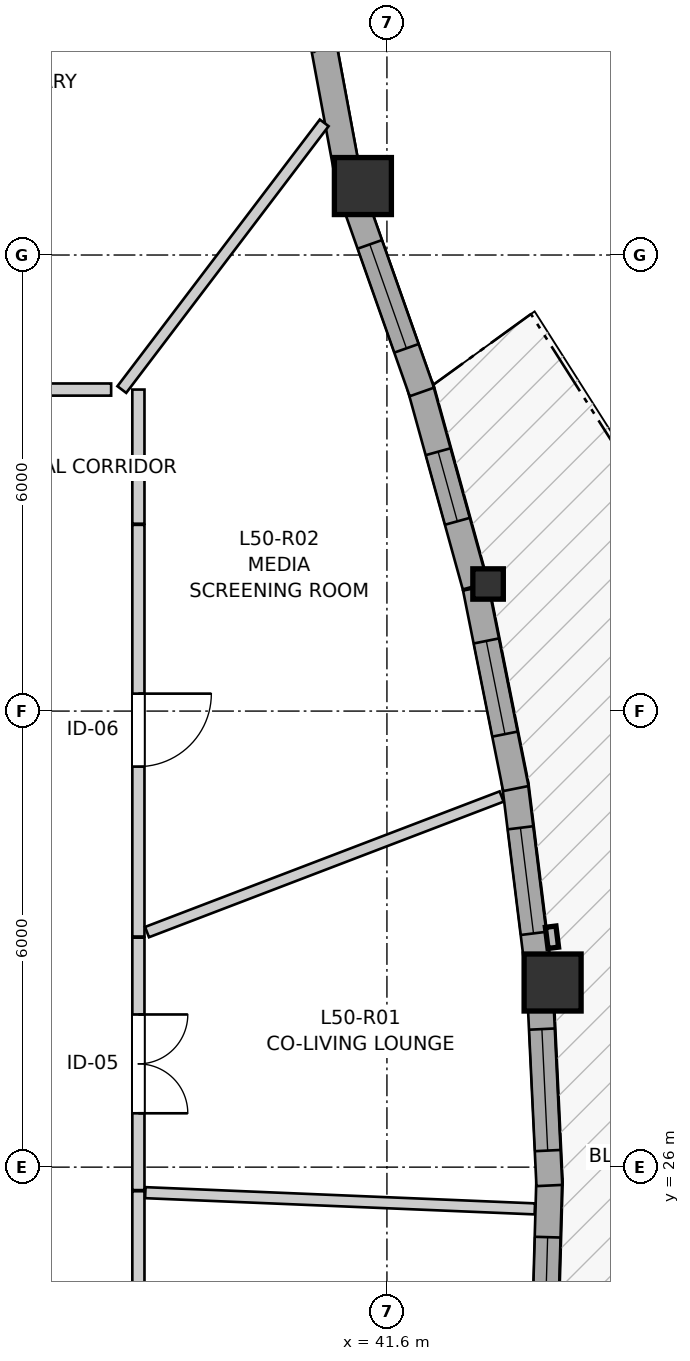
"""IFC4 building model, lengths in metres.
Left out: names, types, materials, properties, quantities, classifications, styles, units other than length and angle.
Written with IfcOpenShell. Run it as: python <this file> out.ifc"""

import sys

from ifc_helpers import new_model, si_unit, direction, frame, frame_2d, origin, origin_2d, place, context, subcontext, project, spatial, rectangle, i_section, extrude, source, transform, mapped, element, fill, save


model = new_model("IFC4")
c1 = context("Model", 3, precision=1e-05, world=origin(), true_north=direction((0.0, 1.0)))
c2 = subcontext(c1, "Body", "Model", "MODEL_VIEW")
j1 = project(units=[si_unit("LENGTHUNIT", "METRE"), si_unit("PLANEANGLEUNIT", "RADIAN")], contexts=[c1])
p1 = place(None, origin())
s1 = spatial("IfcSite", under=j1, at=p1, CompositionType="ELEMENT")
p2 = place(p1, origin())
s2 = spatial("IfcBuilding", under=s1, at=p2, CompositionType="ELEMENT")
p3 = place(p2, frame((0.0, 0.0, 168.2)))
s3 = spatial("IfcBuildingStorey", under=s2, at=p3, CompositionType="ELEMENT", Elevation=168.2)
m1 = source(origin(), c2, "Body", "SweptSolid", [
    extrude(rectangle(XDim=0.75, YDim=0.75, at=origin_2d()), origin(), (0.0, 0.0, 1.0), 2.95),
])
p4 = place(p3, frame((43.78, 28.429, 0.0), z_axis=(0.0, 0.0, 1.0), x_axis=(1.0, 0.0, 0.0)))
e1 = element("IfcColumn", 1, at=p4, inside=s3, PredefinedType="COLUMN", context=c2, shape_type="MappedRepresentation", body=[
    mapped(m1, transform((0.0, 0.0, 0.0), x_axis=(1.0, 0.0, 0.0), y_axis=(0.0, 1.0, 0.0), z_axis=(0.0, 0.0, 1.0), scale=1.0)),
])
m2 = source(origin(), c2, "Body", "SweptSolid", [
    extrude(i_section(OverallWidth=0.401, OverallDepth=0.399, WebThickness=0.023, FlangeThickness=0.036, FilletRadius=0.015, at=origin_2d()), origin(), (0.0, 0.0, 1.0), 2.95),
])
p5 = place(p3, frame((42.931, 33.672, 0.0), z_axis=(0.0, 0.0, 1.0), x_axis=(1.0, 0.0, 0.0)))
e2 = element("IfcColumn", 2, at=p5, inside=s3, PredefinedType="PILASTER", context=c2, shape_type="MappedRepresentation", body=[
    mapped(m2, transform((0.0, 0.0, 0.0), x_axis=(1.0, 0.0, 0.0), y_axis=(0.0, 1.0, 0.0), z_axis=(0.0, 0.0, 1.0), scale=1.0)),
])
p6 = place(p3, frame((41.284, 38.907, 0.0), z_axis=(0.0, 0.0, 1.0), x_axis=(1.0, 0.0, 0.0)))
e3 = element("IfcColumn", 3, at=p6, inside=s3, PredefinedType="COLUMN", context=c2, shape_type="MappedRepresentation", body=[
    mapped(m1, transform((0.0, 0.0, 0.0), x_axis=(1.0, 0.0, 0.0), y_axis=(0.0, 1.0, 0.0), z_axis=(0.0, 0.0, 1.0), scale=1.0)),
])
p7 = place(p3, frame((43.661, 23.203, 0.0), z_axis=(0.0, 0.0, 1.0), x_axis=(0.028240970376, 0.999601144253, 0.0)))
e4 = element("IfcWall", 4, at=p7, inside=s3, PredefinedType="SOLIDWALL", context=c2, shape_type="SweptSolid", body=[
    extrude(rectangle(XDim=2.645, YDim=0.34, at=frame_2d((1.323, 0.0))), origin(), (0.0, 0.0, 1.0), 2.53),
])
p8 = place(p7, frame((0.427, 0.0, 0.82)))
e5 = element("IfcOpeningElement", 5, at=p8, cuts=e4, PredefinedType="OPENING", context=c2, shape_type="SweptSolid", body=[
    extrude(rectangle(XDim=1.45, YDim=1.25, at=frame_2d((0.725, 0.625))), frame((0.0, 0.18, 0.0), z_axis=(0.0, -1.0, 0.0), x_axis=(1.0, 0.0, 0.0)), (0.0, 0.0, 1.0), 0.36),
])
p9 = place(p3, frame((43.737, 25.758, 0.0), z_axis=(0.0, 0.0, 1.0), x_axis=(-0.047648310491, 0.998864174204, 0.0)))
e6 = element("IfcWall", 6, at=p9, inside=s3, PredefinedType="SOLIDWALL", context=c2, shape_type="SweptSolid", body=[
    extrude(rectangle(XDim=2.511, YDim=0.34, at=frame_2d((1.255, 0.0))), origin(), (0.0, 0.0, 1.0), 2.53),
])
p10 = place(p9, frame((0.46, 0.0, 0.82)))
e7 = element("IfcOpeningElement", 7, at=p10, cuts=e6, PredefinedType="OPENING", context=c2, shape_type="SweptSolid", body=[
    extrude(rectangle(XDim=1.6, YDim=1.35, at=frame_2d((0.8, 0.675))), frame((0.0, 0.18, 0.0), z_axis=(0.0, -1.0, 0.0), x_axis=(1.0, 0.0, 0.0)), (0.0, 0.0, 1.0), 0.36),
])
p11 = place(p3, frame((43.592, 28.562, 0.0), z_axis=(0.0, 0.0, 1.0), x_axis=(-0.122868649786, 0.992422941542, 0.0)))
e8 = element("IfcWall", 8, at=p11, inside=s3, PredefinedType="SOLIDWALL", context=c2, shape_type="SweptSolid", body=[
    extrude(rectangle(XDim=2.525, YDim=0.34, at=frame_2d((1.263, 0.0))), origin(), (0.0, 0.0, 1.0), 2.53),
])
p12 = place(p11, frame((0.517, 0.0, 0.82)))
e9 = element("IfcOpeningElement", 9, at=p12, cuts=e8, PredefinedType="OPENING", context=c2, shape_type="SweptSolid", body=[
    extrude(rectangle(XDim=1.4, YDim=1.35, at=frame_2d((0.7, 0.675))), frame((0.0, 0.18, 0.0), z_axis=(0.0, -1.0, 0.0), x_axis=(1.0, 0.0, 0.0)), (0.0, 0.0, 1.0), 0.36),
])
p13 = place(p3, frame((43.296, 30.981, 0.0), z_axis=(0.0, 0.0, 1.0), x_axis=(-0.196185936796, 0.980566712776, 0.0)))
e10 = element("IfcWall", 10, at=p13, inside=s3, PredefinedType="SOLIDWALL", context=c2, shape_type="SweptSolid", body=[
    extrude(rectangle(XDim=2.69, YDim=0.34, at=frame_2d((1.345, 0.0))), origin(), (0.0, 0.0, 1.0), 2.53),
])
p14 = place(p13, frame((0.73, 0.0, 0.82)))
e11 = element("IfcOpeningElement", 11, at=p14, cuts=e10, PredefinedType="OPENING", context=c2, shape_type="SweptSolid", body=[
    extrude(rectangle(XDim=1.25, YDim=1.35, at=frame_2d((0.625, 0.675))), frame((0.0, 0.18, 0.0), z_axis=(0.0, -1.0, 0.0), x_axis=(1.0, 0.0, 0.0)), (0.0, 0.0, 1.0), 0.36),
])
p15 = place(p3, frame((42.762, 33.646, 0.0), z_axis=(0.0, 0.0, 1.0), x_axis=(-0.266469604257, 0.963843322334, 0.0)))
e12 = element("IfcWall", 12, at=p15, inside=s3, PredefinedType="SOLIDWALL", context=c2, shape_type="SweptSolid", body=[
    extrude(rectangle(XDim=2.735, YDim=0.34, at=frame_2d((1.367, 0.0))), origin(), (0.0, 0.0, 1.0), 2.53),
])
p16 = place(p15, frame((0.882, 0.0, 0.82)))
e13 = element("IfcOpeningElement", 13, at=p16, cuts=e12, PredefinedType="OPENING", context=c2, shape_type="SweptSolid", body=[
    extrude(rectangle(XDim=0.95, YDim=1.35, at=frame_2d((0.475, 0.675))), frame((0.0, 0.18, 0.0), z_axis=(0.0, -1.0, 0.0), x_axis=(1.0, 0.0, 0.0)), (0.0, 0.0, 1.0), 0.36),
])
p17 = place(p3, frame((42.059, 36.198, 0.0), z_axis=(0.0, 0.0, 1.0), x_axis=(-0.332714406781, 0.943027636668, 0.0)))
e14 = element("IfcWall", 14, at=p17, inside=s3, PredefinedType="SOLIDWALL", context=c2, shape_type="SweptSolid", body=[
    extrude(rectangle(XDim=2.658, YDim=0.34, at=frame_2d((1.329, 0.0))), origin(), (0.0, 0.0, 1.0), 2.53),
])
p18 = place(p17, frame((0.609, 0.0, 0.82)))
e15 = element("IfcOpeningElement", 15, at=p18, cuts=e14, PredefinedType="OPENING", context=c2, shape_type="SweptSolid", body=[
    extrude(rectangle(XDim=1.45, YDim=1.25, at=frame_2d((0.725, 0.625))), frame((0.0, 0.18, 0.0), z_axis=(0.0, -1.0, 0.0), x_axis=(1.0, 0.0, 0.0)), (0.0, 0.0, 1.0), 0.36),
])
p19 = place(p3, frame((41.088, 39.029, 0.0), z_axis=(0.0, 0.0, 1.0), x_axis=(-0.18244577317, 0.983215917209, 0.0)))
e16 = element("IfcWall", 16, at=p19, inside=s3, PredefinedType="SOLIDWALL", context=c2, shape_type="SweptSolid", body=[
    extrude(rectangle(XDim=1.888, YDim=0.34, at=frame_2d((0.944, 0.0))), origin(), (0.0, 0.0, 1.0), 2.53),
])
p20 = place(p3, frame((38.33, 34.45, 0.0), z_axis=(0.0, 0.0, 1.0), x_axis=(0.0, -1.0, 0.0)))
e17 = element("IfcWall", 17, at=p20, inside=s3, PredefinedType="PARTITIONING", context=c2, shape_type="SweptSolid", body=[
    extrude(rectangle(XDim=5.416, YDim=0.16, at=frame_2d((2.708, 0.0))), origin(), (0.0, 0.0, 1.0), 2.588),
])
p21 = place(p20, frame((2.22, 0.0, 0.0)))
e18 = element("IfcOpeningElement", 18, at=p21, cuts=e17, PredefinedType="OPENING", context=c2, shape_type="SweptSolid", body=[
    extrude(rectangle(XDim=0.96, YDim=2.1, at=frame_2d((0.48, 1.05))), frame((0.0, 0.09, 0.0), z_axis=(0.0, -1.0, 0.0), x_axis=(1.0, 0.0, 0.0)), (0.0, 0.0, 1.0), 0.18),
])
p22 = place(p3, frame((38.33, 25.683, 0.0), z_axis=(0.0, 0.0, 1.0), x_axis=(0.0, -1.0, 0.0)))
e19 = element("IfcWall", 19, at=p22, inside=s3, PredefinedType="PARTITIONING", context=c2, shape_type="SweptSolid", body=[
    extrude(rectangle(XDim=4.483, YDim=0.16, at=frame_2d((2.242, 0.0))), origin(), (0.0, 0.0, 1.0), 2.95),
])
p23 = place(p22, frame((1.769, 0.0, 0.0)))
e20 = element("IfcOpeningElement", 20, at=p23, cuts=e19, PredefinedType="OPENING", context=c2, shape_type="SweptSolid", body=[
    extrude(rectangle(XDim=0.96, YDim=2.1, at=frame_2d((0.48, 1.05))), frame((0.0, 0.09, 0.0), z_axis=(0.0, -1.0, 0.0), x_axis=(1.0, 0.0, 0.0)), (0.0, 0.0, 1.0), 0.18),
])
p24 = place(p3, frame((38.33, 29.019, 0.0), z_axis=(0.0, 0.0, 1.0), x_axis=(0.0, -1.0, 0.0)))
e21 = element("IfcWall", 21, at=p24, inside=s3, PredefinedType="PARTITIONING", context=c2, shape_type="SweptSolid", body=[
    extrude(rectangle(XDim=3.321, YDim=0.16, at=frame_2d((1.661, 0.0))), origin(), (0.0, 0.0, 1.0), 2.95),
])
p25 = place(p24, frame((1.01, 0.0, 0.0)))
e22 = element("IfcOpeningElement", 22, at=p25, cuts=e21, PredefinedType="OPENING", context=c2, shape_type="SweptSolid", body=[
    extrude(rectangle(XDim=1.3, YDim=2.1, at=frame_2d((0.65, 1.05))), frame((0.0, 0.09, 0.0), z_axis=(0.0, -1.0, 0.0), x_axis=(1.0, 0.0, 0.0)), (0.0, 0.0, 1.0), 0.18),
])
p26 = place(p3, frame((38.421, 25.664, 0.0), z_axis=(0.0, 0.0, 1.0), x_axis=(0.999132413059, -0.041646382499, 0.0)))
e23 = element("IfcWall", 23, at=p26, inside=s3, PredefinedType="PARTITIONING", context=c2, shape_type="SweptSolid", body=[
    extrude(rectangle(XDim=5.129, YDim=0.145, at=frame_2d((2.565, 0.0))), origin(), (0.0, 0.0, 1.0), 2.95),
])
p27 = place(p3, frame((38.443, 29.092, 0.0), z_axis=(0.0, 0.0, 1.0), x_axis=(0.934064302859, 0.357104855923, 0.0)))
e24 = element("IfcWall", 24, at=p27, inside=s3, PredefinedType="PARTITIONING", context=c2, shape_type="SweptSolid", body=[
    extrude(rectangle(XDim=4.995, YDim=0.145, at=frame_2d((2.498, 0.0))), origin(), (0.0, 0.0, 1.0), 2.95),
])
p28 = place(p3, frame((38.112, 36.23, 0.0), z_axis=(0.0, 0.0, 1.0), x_axis=(0.604495658019, 0.796608435453, 0.0)))
e25 = element("IfcWall", 25, at=p28, inside=s3, PredefinedType="PARTITIONING", context=c2, shape_type="SweptSolid", body=[
    extrude(rectangle(XDim=4.405, YDim=0.145, at=frame_2d((2.202, 0.0))), origin(), (0.0, 0.0, 1.0), 2.95),
])
p29 = place(p3, frame((38.33, 34.465, 0.0), z_axis=(0.0, 0.0, 1.0), x_axis=(0.0, 1.0, 0.0)))
e26 = element("IfcWall", 26, at=p29, inside=s3, PredefinedType="PARTITIONING", context=c2, shape_type="SweptSolid", body=[
    extrude(rectangle(XDim=1.765, YDim=0.16, at=frame_2d((0.882, 0.0))), origin(), (0.0, 0.0, 1.0), 2.588),
])
p30 = place(p3, frame((36.565, 36.23, 0.0), z_axis=(0.0, 0.0, 1.0), x_axis=(1.0, 0.0, 0.0)))
e27 = element("IfcWall", 27, at=p30, inside=s3, PredefinedType="PARTITIONING", context=c2, shape_type="SweptSolid", body=[
    extrude(rectangle(XDim=1.406, YDim=0.16, at=frame_2d((0.703, 0.0))), origin(), (0.0, 0.0, 1.0), 2.95),
])
m3 = source(origin(), c2, "Body", "SweptSolid", [
    extrude(rectangle(XDim=1.45, YDim=1.25, at=frame_2d((0.725, 0.625))), frame((0.0, 0.03, 0.0), z_axis=(0.0, -1.0, 0.0), x_axis=(1.0, 0.0, 0.0)), (0.0, 0.0, 1.0), 0.06),
])
p31 = place(p8, origin())
e28 = element("IfcWindow", 28, at=p31, inside=s3, PartitioningType="SINGLE_PANEL", PredefinedType="WINDOW", context=c2, shape_type="MappedRepresentation", body=[
    mapped(m3, transform((0.0, 0.0, 0.0), x_axis=(1.0, 0.0, 0.0), y_axis=(0.0, 1.0, 0.0), z_axis=(0.0, 0.0, 1.0), scale=1.0)),
])
fill(e5, e28)
m4 = source(origin(), c2, "Body", "SweptSolid", [
    extrude(rectangle(XDim=1.6, YDim=1.35, at=frame_2d((0.8, 0.675))), frame((0.0, 0.03, 0.0), z_axis=(0.0, -1.0, 0.0), x_axis=(1.0, 0.0, 0.0)), (0.0, 0.0, 1.0), 0.06),
])
p32 = place(p10, origin())
e29 = element("IfcWindow", 29, at=p32, inside=s3, PartitioningType="SINGLE_PANEL", PredefinedType="WINDOW", context=c2, shape_type="MappedRepresentation", body=[
    mapped(m4, transform((0.0, 0.0, 0.0), x_axis=(1.0, 0.0, 0.0), y_axis=(0.0, 1.0, 0.0), z_axis=(0.0, 0.0, 1.0), scale=1.0)),
])
fill(e7, e29)
m5 = source(origin(), c2, "Body", "SweptSolid", [
    extrude(rectangle(XDim=1.4, YDim=1.35, at=frame_2d((0.7, 0.675))), frame((0.0, 0.03, 0.0), z_axis=(0.0, -1.0, 0.0), x_axis=(1.0, 0.0, 0.0)), (0.0, 0.0, 1.0), 0.06),
])
p33 = place(p12, origin())
e30 = element("IfcWindow", 30, at=p33, inside=s3, PartitioningType="SINGLE_PANEL", PredefinedType="WINDOW", context=c2, shape_type="MappedRepresentation", body=[
    mapped(m5, transform((0.0, 0.0, 0.0), x_axis=(1.0, 0.0, 0.0), y_axis=(0.0, 1.0, 0.0), z_axis=(0.0, 0.0, 1.0), scale=1.0)),
])
fill(e9, e30)
m6 = source(origin(), c2, "Body", "SweptSolid", [
    extrude(rectangle(XDim=1.25, YDim=1.35, at=frame_2d((0.625, 0.675))), frame((0.0, 0.03, 0.0), z_axis=(0.0, -1.0, 0.0), x_axis=(1.0, 0.0, 0.0)), (0.0, 0.0, 1.0), 0.06),
])
p34 = place(p14, origin())
e31 = element("IfcWindow", 31, at=p34, inside=s3, PartitioningType="SINGLE_PANEL", PredefinedType="WINDOW", context=c2, shape_type="MappedRepresentation", body=[
    mapped(m6, transform((0.0, 0.0, 0.0), x_axis=(1.0, 0.0, 0.0), y_axis=(0.0, 1.0, 0.0), z_axis=(0.0, 0.0, 1.0), scale=1.0)),
])
fill(e11, e31)
m7 = source(origin(), c2, "Body", "SweptSolid", [
    extrude(rectangle(XDim=0.95, YDim=1.35, at=frame_2d((0.475, 0.675))), frame((0.0, 0.03, 0.0), z_axis=(0.0, -1.0, 0.0), x_axis=(1.0, 0.0, 0.0)), (0.0, 0.0, 1.0), 0.06),
])
p35 = place(p16, origin())
e32 = element("IfcWindow", 32, at=p35, inside=s3, PartitioningType="SINGLE_PANEL", PredefinedType="WINDOW", context=c2, shape_type="MappedRepresentation", body=[
    mapped(m7, transform((0.0, 0.0, 0.0), x_axis=(1.0, 0.0, 0.0), y_axis=(0.0, 1.0, 0.0), z_axis=(0.0, 0.0, 1.0), scale=1.0)),
])
fill(e13, e32)
p36 = place(p18, origin())
e33 = element("IfcWindow", 33, at=p36, inside=s3, PartitioningType="SINGLE_PANEL", PredefinedType="WINDOW", context=c2, shape_type="MappedRepresentation", body=[
    mapped(m3, transform((0.0, 0.0, 0.0), x_axis=(1.0, 0.0, 0.0), y_axis=(0.0, 1.0, 0.0), z_axis=(0.0, 0.0, 1.0), scale=1.0)),
])
fill(e15, e33)
m8 = source(origin(), c2, "Body", "SweptSolid", [
    extrude(rectangle(XDim=0.96, YDim=2.1, at=frame_2d((0.48, 1.05))), frame((0.0, 0.025, 0.0), z_axis=(0.0, -1.0, 0.0), x_axis=(1.0, 0.0, 0.0)), (0.0, 0.0, 1.0), 0.05),
])
p37 = place(p21, origin())
e34 = element("IfcDoor", 34, at=p37, inside=s3, OperationType="SINGLE_SWING_LEFT", PredefinedType="DOOR", context=c2, shape_type="MappedRepresentation", body=[
    mapped(m8, transform((0.0, 0.0, 0.0), x_axis=(1.0, 0.0, 0.0), y_axis=(0.0, 1.0, 0.0), z_axis=(0.0, 0.0, 1.0), scale=1.0)),
])
fill(e18, e34)
m9 = source(origin(), c2, "Body", "SweptSolid", [
    extrude(rectangle(XDim=1.3, YDim=2.1, at=frame_2d((0.65, 1.05))), frame((0.0, 0.025, 0.0), z_axis=(0.0, -1.0, 0.0), x_axis=(1.0, 0.0, 0.0)), (0.0, 0.0, 1.0), 0.05),
])
p38 = place(p25, origin())
e35 = element("IfcDoor", 35, at=p38, inside=s3, OperationType="DOUBLE_DOOR_SINGLE_SWING", PredefinedType="DOOR", context=c2, shape_type="MappedRepresentation", body=[
    mapped(m9, transform((0.0, 0.0, 0.0), x_axis=(1.0, 0.0, 0.0), y_axis=(0.0, 1.0, 0.0), z_axis=(0.0, 0.0, 1.0), scale=1.0)),
])
fill(e22, e35)
save(model, sys.argv[1])
